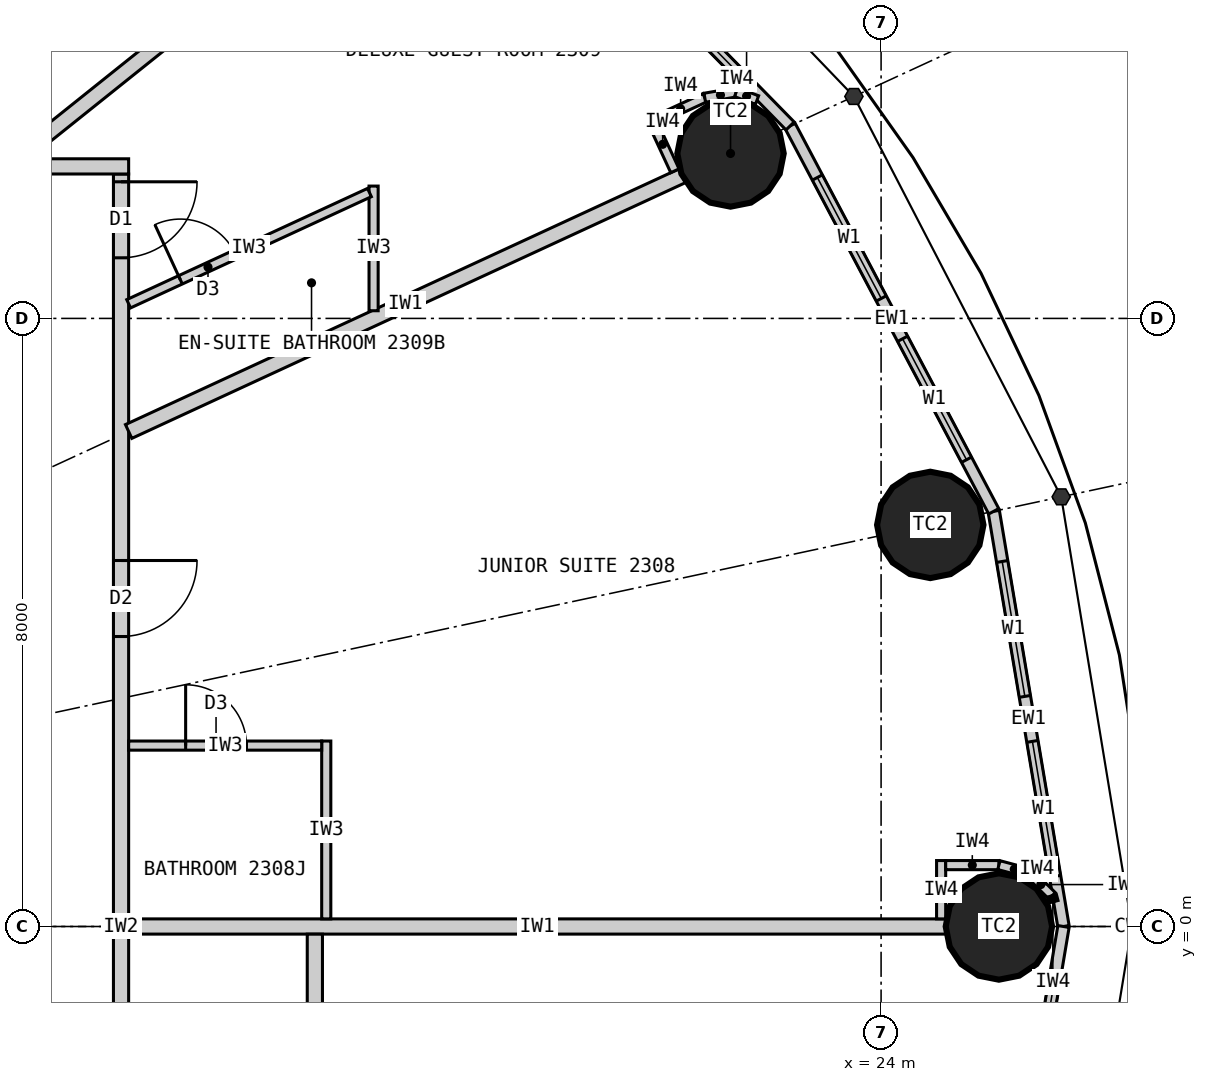
"""IFC4 building model, lengths in metres.
Left out: names, types, materials, properties, quantities, classifications, styles, units other than length and angle.
Written with IfcOpenShell. Run it as: python <this file> out.ifc"""

import sys

from ifc_helpers import new_model, si_unit, direction, frame, frame_2d, origin, origin_2d, place, context, subcontext, project, spatial, rectangle, circle, extrude, clip, halfspace, element, fill, save


model = new_model("IFC4")
c1 = context("Model", 3, precision=1e-05, world=origin(), true_north=direction((0.0, 1.0)))
c2 = subcontext(c1, "Body", "Model", "MODEL_VIEW")
j1 = project(units=[si_unit("LENGTHUNIT", "METRE"), si_unit("PLANEANGLEUNIT", "RADIAN")], contexts=[c1])
p1 = place(None, origin())
s1 = spatial("IfcSite", under=j1, at=p1, CompositionType="ELEMENT")
p2 = place(p1, origin())
s2 = spatial("IfcBuilding", under=s1, at=p2, CompositionType="ELEMENT")
p3 = place(p2, frame((0.0, 0.0, 90.3)))
s3 = spatial("IfcBuildingStorey", under=s2, at=p3, CompositionType="ELEMENT", Elevation=90.3)
for number, where, z_axis, x_axis in (
    (1, (25.55, 0.0, 0.0), (0.0, 0.0, 1.0), (1.0, 0.0, 0.0)),
    (2, (24.647, 5.283, 0.0), (0.0, 0.0, 1.0), (1.0, 0.0, 0.0)),
    (3, (22.019, 10.17, 0.0), (0.0, 0.0, 1.0), (1.0, 0.0, 0.0)),
):
    element("IfcColumn", number, at=place(p3, frame(where, z_axis=z_axis, x_axis=x_axis)), inside=s3, PredefinedType="COLUMN", context=c2, shape_type="Clipping", body=[
        clip(extrude(circle(Radius=0.7, at=origin_2d()), origin(), (0.0, 0.0, 1.0), 3.3), halfspace(frame((0.0, 0.0, 2.25), z_axis=(0.0, 0.0, 1.0), x_axis=(1.0, 0.0, 0.0)), False)),
    ])
p4 = place(p3, frame((26.4, 0.0, 0.0), z_axis=(0.0, 0.0, 1.0), x_axis=(-0.165642551694, 0.986185857264, 0.0)))
e4 = element("IfcWall", 4, at=p4, inside=s3, PredefinedType="ELEMENTEDWALL", context=c2, shape_type="SweptSolid", body=[
    extrude(rectangle(XDim=5.539, YDim=0.15, at=frame_2d((2.77, 0.0))), origin(), (0.0, 0.0, 1.0), 3.05),
])
p5 = place(p4, frame((0.669, 0.0, 0.9)))
e5 = element("IfcOpeningElement", 5, at=p5, cuts=e4, PredefinedType="OPENING", context=c2, shape_type="SweptSolid", body=[
    extrude(rectangle(XDim=1.8, YDim=1.9, at=frame_2d((0.9, 0.95))), frame((0.0, 0.085, 0.0), z_axis=(0.0, -1.0, 0.0), x_axis=(1.0, 0.0, 0.0)), (0.0, 0.0, 1.0), 0.17),
])
p6 = place(p4, frame((3.07, 0.0, 0.9)))
e6 = element("IfcOpeningElement", 6, at=p6, cuts=e4, PredefinedType="OPENING", context=c2, shape_type="SweptSolid", body=[
    extrude(rectangle(XDim=1.8, YDim=1.9, at=frame_2d((0.9, 0.95))), frame((0.0, 0.085, 0.0), z_axis=(0.0, -1.0, 0.0), x_axis=(1.0, 0.0, 0.0)), (0.0, 0.0, 1.0), 0.17),
])
p7 = place(p3, frame((25.482, 5.462, 0.0), z_axis=(0.0, 0.0, 1.0), x_axis=(-0.467296867008, 0.884100468321, 0.0)))
e7 = element("IfcWall", 7, at=p7, inside=s3, PredefinedType="ELEMENTEDWALL", context=c2, shape_type="SweptSolid", body=[
    extrude(rectangle(XDim=5.734, YDim=0.15, at=frame_2d((2.867, 0.0))), origin(), (0.0, 0.0, 1.0), 3.05),
])
p8 = place(p7, frame((0.767, 0.0, 0.9)))
e8 = element("IfcOpeningElement", 8, at=p8, cuts=e7, PredefinedType="OPENING", context=c2, shape_type="SweptSolid", body=[
    extrude(rectangle(XDim=1.8, YDim=1.9, at=frame_2d((0.9, 0.95))), frame((0.0, 0.085, 0.0), z_axis=(0.0, -1.0, 0.0), x_axis=(1.0, 0.0, 0.0)), (0.0, 0.0, 1.0), 0.17),
])
p9 = place(p7, frame((3.167, 0.0, 0.9)))
e9 = element("IfcOpeningElement", 9, at=p9, cuts=e7, PredefinedType="OPENING", context=c2, shape_type="SweptSolid", body=[
    extrude(rectangle(XDim=1.8, YDim=1.9, at=frame_2d((0.9, 0.95))), frame((0.0, 0.085, 0.0), z_axis=(0.0, -1.0, 0.0), x_axis=(1.0, 0.0, 0.0)), (0.0, 0.0, 1.0), 0.17),
])
p10 = place(p3, frame((22.803, 10.532, 0.0), z_axis=(0.0, 0.0, 1.0), x_axis=(-0.699602905915, 0.714531856557, 0.0)))
e10 = element("IfcWall", 10, at=p10, inside=s3, PredefinedType="ELEMENTEDWALL", context=c2, shape_type="SweptSolid", body=[
    extrude(rectangle(XDim=6.051, YDim=0.15, at=frame_2d((3.025, 0.0))), origin(), (0.0, 0.0, 1.0), 3.05),
])
p11 = place(p10, frame((0.926, 0.0, 0.9)))
e11 = element("IfcOpeningElement", 11, at=p11, cuts=e10, PredefinedType="OPENING", context=c2, shape_type="SweptSolid", body=[
    extrude(rectangle(XDim=1.8, YDim=1.9, at=frame_2d((0.9, 0.95))), frame((0.0, 0.085, 0.0), z_axis=(0.0, -1.0, 0.0), x_axis=(1.0, 0.0, 0.0)), (0.0, 0.0, 1.0), 0.17),
])
p12 = place(p10, frame((3.325, 0.0, 0.9)))
e12 = element("IfcOpeningElement", 12, at=p12, cuts=e10, PredefinedType="OPENING", context=c2, shape_type="SweptSolid", body=[
    extrude(rectangle(XDim=1.8, YDim=1.9, at=frame_2d((0.9, 0.95))), frame((0.0, 0.085, 0.0), z_axis=(0.0, -1.0, 0.0), x_axis=(1.0, 0.0, 0.0)), (0.0, 0.0, 1.0), 0.17),
])
p13 = place(p3, frame((25.482, -5.462, 0.0), z_axis=(0.0, 0.0, 1.0), x_axis=(0.165642551694, 0.986185857264, 0.0)))
e13 = element("IfcWall", 13, at=p13, inside=s3, PredefinedType="ELEMENTEDWALL", context=c2, shape_type="SweptSolid", body=[
    extrude(rectangle(XDim=5.539, YDim=0.15, at=frame_2d((2.77, 0.0))), origin(), (0.0, 0.0, 1.0), 3.05),
])
p14 = place(p13, frame((0.669, 0.0, 0.9)))
e14 = element("IfcOpeningElement", 14, at=p14, cuts=e13, PredefinedType="OPENING", context=c2, shape_type="SweptSolid", body=[
    extrude(rectangle(XDim=1.8, YDim=1.9, at=frame_2d((0.9, 0.95))), frame((0.0, 0.085, 0.0), z_axis=(0.0, -1.0, 0.0), x_axis=(1.0, 0.0, 0.0)), (0.0, 0.0, 1.0), 0.17),
])
p15 = place(p13, frame((3.07, 0.0, 0.9)))
e15 = element("IfcOpeningElement", 15, at=p15, cuts=e13, PredefinedType="OPENING", context=c2, shape_type="SweptSolid", body=[
    extrude(rectangle(XDim=1.8, YDim=1.9, at=frame_2d((0.9, 0.95))), frame((0.0, 0.085, 0.0), z_axis=(0.0, -1.0, 0.0), x_axis=(1.0, 0.0, 0.0)), (0.0, 0.0, 1.0), 0.17),
])
p16 = place(p3, frame((14.0, -9.9, 0.0), z_axis=(0.0, 0.0, 1.0), x_axis=(0.0, 1.0, 0.0)))
e16 = element("IfcWall", 16, at=p16, inside=s3, PredefinedType="PARTITIONING", context=c2, shape_type="SweptSolid", body=[
    extrude(rectangle(XDim=19.8, YDim=0.2, at=frame_2d((9.9, 0.0))), origin(), (0.0, 0.0, 1.0), 3.05),
])
p17 = place(p16, frame((0.204, 0.0, 0.0)))
e17 = element("IfcOpeningElement", 17, at=p17, cuts=e16, PredefinedType="OPENING", context=c2, shape_type="SweptSolid", body=[
    extrude(rectangle(XDim=1.0, YDim=2.2, at=frame_2d((0.5, 1.1))), frame((0.0, 0.11, 0.0), z_axis=(0.0, -1.0, 0.0), x_axis=(1.0, 0.0, 0.0)), (0.0, 0.0, 1.0), 0.22),
])
p18 = place(p16, frame((13.715, 0.0, 0.0)))
e18 = element("IfcOpeningElement", 18, at=p18, cuts=e16, PredefinedType="OPENING", context=c2, shape_type="SweptSolid", body=[
    extrude(rectangle(XDim=1.0, YDim=2.2, at=frame_2d((0.5, 1.1))), frame((0.0, 0.11, 0.0), z_axis=(0.0, -1.0, 0.0), x_axis=(1.0, 0.0, 0.0)), (0.0, 0.0, 1.0), 0.22),
])
p19 = place(p16, frame((18.698, 0.0, 0.0)))
e19 = element("IfcOpeningElement", 19, at=p19, cuts=e16, PredefinedType="OPENING", context=c2, shape_type="SweptSolid", body=[
    extrude(rectangle(XDim=1.0, YDim=2.2, at=frame_2d((0.5, 1.1))), frame((0.0, 0.11, 0.0), z_axis=(0.0, -1.0, 0.0), x_axis=(1.0, 0.0, 0.0)), (0.0, 0.0, 1.0), 0.22),
])
p20 = place(p3, frame((14.1, 0.0, 0.0), z_axis=(0.0, 0.0, 1.0), x_axis=(1.0, 0.0, 0.0)))
e20 = element("IfcWall", 20, at=p20, inside=s3, PredefinedType="PARTITIONING", context=c2, shape_type="SweptSolid", body=[
    extrude(rectangle(XDim=10.75, YDim=0.2, at=frame_2d((5.375, 0.0))), origin(), (0.0, 0.0, 1.0), 2.25),
])
p21 = place(p3, frame((14.1, 6.512, 0.0), z_axis=(0.0, 0.0, 1.0), x_axis=(0.907832871056, 0.419332181247, 0.0)))
e21 = element("IfcWall", 21, at=p21, inside=s3, PredefinedType="PARTITIONING", context=c2, shape_type="SweptSolid", body=[
    extrude(rectangle(XDim=8.023, YDim=0.2, at=frame_2d((4.011, 0.0))), origin(), (0.0, 0.0, 1.0), 2.15),
])
p22 = place(p3, frame((12.625, 10.1, 0.0), z_axis=(0.0, 0.0, 1.0), x_axis=(0.780892451574, 0.624665493744, 0.0)))
e22 = element("IfcWall", 22, at=p22, inside=s3, PredefinedType="PARTITIONING", context=c2, shape_type="SweptSolid", body=[
    extrude(rectangle(XDim=6.045, YDim=0.2, at=frame_2d((3.022, 0.0))), origin(), (0.0, 0.0, 1.0), 2.25),
])
p23 = place(p3, frame((16.55, -9.609, 0.0), z_axis=(0.0, 0.0, 1.0), x_axis=(0.0, 1.0, 0.0)))
e23 = element("IfcWall", 23, at=p23, inside=s3, PredefinedType="PARTITIONING", context=c2, shape_type="SweptSolid", body=[
    extrude(rectangle(XDim=9.508, YDim=0.2, at=frame_2d((4.754, 0.0))), origin(), (0.0, 0.0, 1.0), 3.05),
])
p24 = place(p23, frame((6.234, 0.0, 0.0)))
e24 = element("IfcOpeningElement", 24, at=p24, cuts=e23, PredefinedType="OPENING", context=c2, shape_type="SweptSolid", body=[
    extrude(rectangle(XDim=0.8, YDim=2.1, at=frame_2d((0.4, 1.05))), frame((0.0, 0.11, 0.0), z_axis=(0.0, -1.0, 0.0), x_axis=(1.0, 0.0, 0.0)), (0.0, 0.0, 1.0), 0.22),
])
p25 = place(p3, frame((16.7, 0.1, 0.0), z_axis=(0.0, 0.0, 1.0), x_axis=(0.0, 1.0, 0.0)))
e25 = element("IfcWall", 25, at=p25, inside=s3, PredefinedType="PARTITIONING", context=c2, shape_type="SweptSolid", body=[
    extrude(rectangle(XDim=2.34, YDim=0.12, at=frame_2d((1.17, 0.0))), origin(), (0.0, 0.0, 1.0), 3.05),
])
p26 = place(p3, frame((14.1, 2.38, 0.0), z_axis=(0.0, 0.0, 1.0), x_axis=(1.0, 0.0, 0.0)))
e26 = element("IfcWall", 26, at=p26, inside=s3, PredefinedType="PARTITIONING", context=c2, shape_type="SweptSolid", body=[
    extrude(rectangle(XDim=2.54, YDim=0.12, at=frame_2d((1.27, 0.0))), origin(), (0.0, 0.0, 1.0), 3.05),
])
p27 = place(p26, frame((0.75, 0.0, 0.0)))
e27 = element("IfcOpeningElement", 27, at=p27, cuts=e26, PredefinedType="OPENING", context=c2, shape_type="SweptSolid", body=[
    extrude(rectangle(XDim=0.8, YDim=2.1, at=frame_2d((0.4, 1.05))), frame((0.0, 0.07, 0.0), z_axis=(0.0, -1.0, 0.0), x_axis=(1.0, 0.0, 0.0)), (0.0, 0.0, 1.0), 0.14),
])
p28 = place(p3, frame((17.323, 8.101, 0.0), z_axis=(0.0, 0.0, 1.0), x_axis=(0.0, 1.0, 0.0)))
e28 = element("IfcWall", 28, at=p28, inside=s3, PredefinedType="PARTITIONING", context=c2, shape_type="SweptSolid", body=[
    extrude(rectangle(XDim=1.64, YDim=0.12, at=frame_2d((0.82, 0.0))), origin(), (0.0, 0.0, 1.0), 3.05),
])
p29 = place(p3, frame((14.1, 8.193, 0.0), z_axis=(0.0, 0.0, 1.0), x_axis=(0.907836493557, 0.419324338628, 0.0)))
e29 = element("IfcWall", 29, at=p29, inside=s3, PredefinedType="PARTITIONING", context=c2, shape_type="SweptSolid", body=[
    extrude(rectangle(XDim=3.49, YDim=0.12, at=frame_2d((1.745, 0.0))), origin(), (0.0, 0.0, 1.0), 3.05),
])
p30 = place(p29, frame((0.75, 0.0, 0.0)))
e30 = element("IfcOpeningElement", 30, at=p30, cuts=e29, PredefinedType="OPENING", context=c2, shape_type="SweptSolid", body=[
    extrude(rectangle(XDim=0.8, YDim=2.1, at=frame_2d((0.4, 1.05))), frame((0.0, 0.07, 0.0), z_axis=(0.0, -1.0, 0.0), x_axis=(1.0, 0.0, 0.0)), (0.0, 0.0, 1.0), 0.14),
])
p31 = place(p3, frame((10.885, 10.0, 0.0), z_axis=(0.0, 0.0, 1.0), x_axis=(1.0, 0.0, 0.0)))
e31 = element("IfcWall", 31, at=p31, inside=s3, PredefinedType="PARTITIONING", context=c2, shape_type="SweptSolid", body=[
    extrude(rectangle(XDim=3.215, YDim=0.2, at=frame_2d((1.607, 0.0))), origin(), (0.0, 0.0, 1.0), 3.05),
])
p32 = place(p3, frame((24.79, 0.1, 0.0), z_axis=(0.0, 0.0, 1.0), x_axis=(0.0, 1.0, 0.0)))
e32 = element("IfcWall", 32, at=p32, inside=s3, PredefinedType="PARTITIONING", context=c2, shape_type="SweptSolid", body=[
    extrude(rectangle(XDim=0.767, YDim=0.12, at=frame_2d((0.384, 0.0))), origin(), (0.0, 0.0, 1.0), 3.05),
])
p33 = place(p3, frame((24.85, 0.808, 0.0), z_axis=(0.0, 0.0, 1.0), x_axis=(1.0, 0.0, 0.0)))
e33 = element("IfcWall", 33, at=p33, inside=s3, PredefinedType="PARTITIONING", context=c2, shape_type="SweptSolid", body=[
    extrude(rectangle(XDim=0.7, YDim=0.12, at=frame_2d((0.35, 0.0))), origin(), (0.0, 0.0, 1.0), 3.05),
])
p34 = place(p3, frame((25.55, 0.808, 0.0), z_axis=(0.0, 0.0, 1.0), x_axis=(0.965807183573, -0.2592614205, 0.0)))
e34 = element("IfcWall", 34, at=p34, inside=s3, PredefinedType="PARTITIONING", context=c2, shape_type="SweptSolid", body=[
    extrude(rectangle(XDim=0.418, YDim=0.12, at=frame_2d((0.209, 0.0))), origin(), (0.0, 0.0, 1.0), 3.05),
])
p35 = place(p3, frame((25.954, 0.699, 0.0), z_axis=(0.0, 0.0, 1.0), x_axis=(0.707106781187, -0.707106781187, 0.0)))
e35 = element("IfcWall", 35, at=p35, inside=s3, PredefinedType="PARTITIONING", context=c2, shape_type="SweptSolid", body=[
    extrude(rectangle(XDim=0.418, YDim=0.12, at=frame_2d((0.209, 0.0))), origin(), (0.0, 0.0, 1.0), 3.05),
])
p36 = place(p3, frame((26.249, 0.404, 0.0), z_axis=(0.0, 0.0, 1.0), x_axis=(0.259754282609, -0.965674744759, 0.0)))
e36 = element("IfcWall", 36, at=p36, inside=s3, PredefinedType="PARTITIONING", context=c2, shape_type="SweptSolid", body=[
    extrude(rectangle(XDim=0.08, YDim=0.12, at=frame_2d((0.04, 0.0))), origin(), (0.0, 0.0, 1.0), 3.05),
])
p37 = place(p3, frame((21.287, 9.942, 0.0), z_axis=(0.0, 0.0, 1.0), x_axis=(-0.419259891039, 0.907866258744, 0.0)))
e37 = element("IfcWall", 37, at=p37, inside=s3, PredefinedType="PARTITIONING", context=c2, shape_type="SweptSolid", body=[
    extrude(rectangle(XDim=0.768, YDim=0.12, at=frame_2d((0.384, 0.0))), origin(), (0.0, 0.0, 1.0), 3.05),
])
p38 = place(p3, frame((21.045, 10.61, 0.0), z_axis=(0.0, 0.0, 1.0), x_axis=(0.907877701396, 0.419235112208, 0.0)))
e38 = element("IfcWall", 38, at=p38, inside=s3, PredefinedType="PARTITIONING", context=c2, shape_type="SweptSolid", body=[
    extrude(rectangle(XDim=0.7, YDim=0.12, at=frame_2d((0.35, 0.0))), origin(), (0.0, 0.0, 1.0), 3.05),
])
p39 = place(p3, frame((21.68, 10.903, 0.0), z_axis=(0.0, 0.0, 1.0), x_axis=(0.985446622073, 0.169985161247, 0.0)))
e39 = element("IfcWall", 39, at=p39, inside=s3, PredefinedType="PARTITIONING", context=c2, shape_type="SweptSolid", body=[
    extrude(rectangle(XDim=0.418, YDim=0.12, at=frame_2d((0.209, 0.0))), origin(), (0.0, 0.0, 1.0), 3.05),
])
p40 = place(p3, frame((22.092, 10.974, 0.0), z_axis=(0.0, 0.0, 1.0), x_axis=(0.938428160676, -0.345474437912, 0.0)))
e40 = element("IfcWall", 40, at=p40, inside=s3, PredefinedType="PARTITIONING", context=c2, shape_type="SweptSolid", body=[
    extrude(rectangle(XDim=0.294, YDim=0.12, at=frame_2d((0.147, 0.0))), origin(), (0.0, 0.0, 1.0), 3.05),
])
p41 = place(p5, origin())
e41 = element("IfcWindow", 41, at=p41, inside=s3, PartitioningType="SINGLE_PANEL", PredefinedType="WINDOW", context=c2, shape_type="SweptSolid", body=[
    extrude(rectangle(XDim=1.8, YDim=1.9, at=frame_2d((0.9, 0.95))), frame((0.0, 0.03, 0.0), z_axis=(0.0, -1.0, 0.0), x_axis=(1.0, 0.0, 0.0)), (0.0, 0.0, 1.0), 0.06),
])
fill(e5, e41)
p42 = place(p6, origin())
e42 = element("IfcWindow", 42, at=p42, inside=s3, PartitioningType="SINGLE_PANEL", PredefinedType="WINDOW", context=c2, shape_type="SweptSolid", body=[
    extrude(rectangle(XDim=1.8, YDim=1.9, at=frame_2d((0.9, 0.95))), frame((0.0, 0.03, 0.0), z_axis=(0.0, -1.0, 0.0), x_axis=(1.0, 0.0, 0.0)), (0.0, 0.0, 1.0), 0.06),
])
fill(e6, e42)
p43 = place(p8, origin())
e43 = element("IfcWindow", 43, at=p43, inside=s3, PartitioningType="SINGLE_PANEL", PredefinedType="WINDOW", context=c2, shape_type="SweptSolid", body=[
    extrude(rectangle(XDim=1.8, YDim=1.9, at=frame_2d((0.9, 0.95))), frame((0.0, 0.03, 0.0), z_axis=(0.0, -1.0, 0.0), x_axis=(1.0, 0.0, 0.0)), (0.0, 0.0, 1.0), 0.06),
])
fill(e8, e43)
p44 = place(p9, origin())
e44 = element("IfcWindow", 44, at=p44, inside=s3, PartitioningType="SINGLE_PANEL", PredefinedType="WINDOW", context=c2, shape_type="SweptSolid", body=[
    extrude(rectangle(XDim=1.8, YDim=1.9, at=frame_2d((0.9, 0.95))), frame((0.0, 0.03, 0.0), z_axis=(0.0, -1.0, 0.0), x_axis=(1.0, 0.0, 0.0)), (0.0, 0.0, 1.0), 0.06),
])
fill(e9, e44)
p45 = place(p11, origin())
e45 = element("IfcWindow", 45, at=p45, inside=s3, PartitioningType="SINGLE_PANEL", PredefinedType="WINDOW", context=c2, shape_type="SweptSolid", body=[
    extrude(rectangle(XDim=1.8, YDim=1.9, at=frame_2d((0.9, 0.95))), frame((0.0, 0.03, 0.0), z_axis=(0.0, -1.0, 0.0), x_axis=(1.0, 0.0, 0.0)), (0.0, 0.0, 1.0), 0.06),
])
fill(e11, e45)
p46 = place(p15, origin())
e46 = element("IfcWindow", 46, at=p46, inside=s3, PartitioningType="SINGLE_PANEL", PredefinedType="WINDOW", context=c2, shape_type="SweptSolid", body=[
    extrude(rectangle(XDim=1.8, YDim=1.9, at=frame_2d((0.9, 0.95))), frame((0.0, 0.03, 0.0), z_axis=(0.0, -1.0, 0.0), x_axis=(1.0, 0.0, 0.0)), (0.0, 0.0, 1.0), 0.06),
])
fill(e15, e46)
p47 = place(p27, origin())
e47 = element("IfcDoor", 47, at=p47, inside=s3, OperationType="SINGLE_SWING_LEFT", PredefinedType="DOOR", context=c2, shape_type="SweptSolid", body=[
    extrude(rectangle(XDim=0.8, YDim=2.1, at=frame_2d((0.4, 1.05))), frame((0.0, 0.025, 0.0), z_axis=(0.0, -1.0, 0.0), x_axis=(1.0, 0.0, 0.0)), (0.0, 0.0, 1.0), 0.05),
])
fill(e27, e47)
p48 = place(p18, origin())
e48 = element("IfcDoor", 48, at=p48, inside=s3, OperationType="SINGLE_SWING_RIGHT", PredefinedType="DOOR", context=c2, shape_type="SweptSolid", body=[
    extrude(rectangle(XDim=1.0, YDim=2.2, at=frame_2d((0.5, 1.1))), frame((0.0, 0.025, 0.0), z_axis=(0.0, -1.0, 0.0), x_axis=(1.0, 0.0, 0.0)), (0.0, 0.0, 1.0), 0.05),
])
fill(e18, e48)
p49 = place(p30, origin())
e49 = element("IfcDoor", 49, at=p49, inside=s3, OperationType="SINGLE_SWING_LEFT", PredefinedType="DOOR", context=c2, shape_type="SweptSolid", body=[
    extrude(rectangle(XDim=0.8, YDim=2.1, at=frame_2d((0.4, 1.05))), frame((0.0, 0.025, 0.0), z_axis=(0.0, -1.0, 0.0), x_axis=(1.0, 0.0, 0.0)), (0.0, 0.0, 1.0), 0.05),
])
fill(e30, e49)
p50 = place(p19, origin())
e50 = element("IfcDoor", 50, at=p50, inside=s3, OperationType="SINGLE_SWING_RIGHT", PredefinedType="DOOR", context=c2, shape_type="SweptSolid", body=[
    extrude(rectangle(XDim=1.0, YDim=2.2, at=frame_2d((0.5, 1.1))), frame((0.0, 0.025, 0.0), z_axis=(0.0, -1.0, 0.0), x_axis=(1.0, 0.0, 0.0)), (0.0, 0.0, 1.0), 0.05),
])
fill(e19, e50)
save(model, sys.argv[1])
